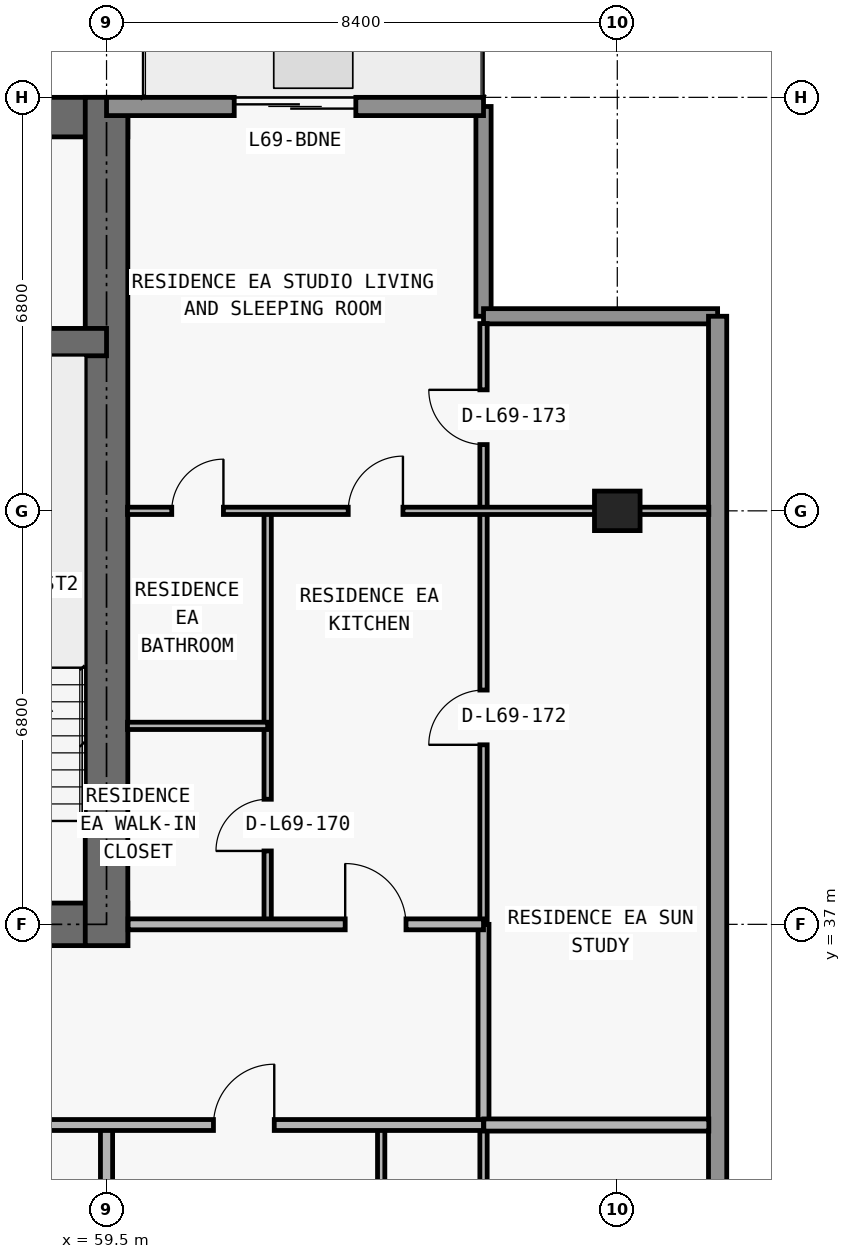
"""IFC4 building model, lengths in metres.
Left out: names, types, materials, properties, quantities, classifications, styles, units other than length and angle.
Written with IfcOpenShell. Run it as: python <this file> out.ifc"""

import sys

from ifc_helpers import new_model, si_unit, direction, frame, frame_2d, origin, origin_2d, place, context, subcontext, project, spatial, rectangle, extrude, element, fill, save


model = new_model("IFC4")
c1 = context("Model", 3, precision=1e-05, world=origin(), true_north=direction((0.0, 1.0)))
c2 = subcontext(c1, "Body", "Model", "MODEL_VIEW")
j1 = project(units=[si_unit("LENGTHUNIT", "METRE"), si_unit("PLANEANGLEUNIT", "RADIAN")], contexts=[c1])
p1 = place(None, origin())
s1 = spatial("IfcSite", under=j1, at=p1, CompositionType="ELEMENT")
p2 = place(p1, origin())
s2 = spatial("IfcBuilding", under=s1, at=p2, CompositionType="ELEMENT")
p3 = place(p2, frame((0.0, 0.0, 246.3)))
s3 = spatial("IfcBuildingStorey", under=s2, at=p3, CompositionType="ELEMENT", Elevation=246.3)
p4 = place(p3, frame((67.9, 43.8, 0.0), z_axis=(0.0, 0.0, 1.0), x_axis=(1.0, 0.0, 0.0)))
e1 = element("IfcColumn", 1, at=p4, inside=s3, PredefinedType="COLUMN", context=c2, shape_type="SweptSolid", body=[
    extrude(rectangle(XDim=0.75, YDim=0.65, at=origin_2d()), origin(), (0.0, 0.0, 1.0), 3.05),
])
p5 = place(p3, frame((17.95, 37.0, 0.0), z_axis=(0.0, 0.0, 1.0), x_axis=(1.0, 0.0, 0.0)))
e2 = element("IfcWall", 2, at=p5, inside=s3, PredefinedType="SHEAR", context=c2, shape_type="SweptSolid", body=[
    extrude(rectangle(XDim=41.9, YDim=0.7, at=frame_2d((20.95, 0.0))), origin(), (0.0, 0.0, 1.0), 3.05),
])
p6 = place(p5, frame((14.35, 0.0, 0.0)))
e3 = element("IfcOpeningElement", 3, at=p6, cuts=e2, PredefinedType="OPENING", context=c2, shape_type="SweptSolid", body=[
    extrude(rectangle(XDim=1.1, YDim=2.15, at=frame_2d((0.55, 1.075))), frame((0.0, 0.36, 0.0), z_axis=(0.0, -1.0, 0.0), x_axis=(1.0, 0.0, 0.0)), (0.0, 0.0, 1.0), 0.72),
])
p7 = place(p5, frame((6.2, 0.0, 0.0)))
e4 = element("IfcOpeningElement", 4, at=p7, cuts=e2, PredefinedType="OPENING", context=c2, shape_type="SweptSolid", body=[
    extrude(rectangle(XDim=1.05, YDim=2.15, at=frame_2d((0.525, 1.075))), frame((0.0, 0.36, 0.0), z_axis=(0.0, -1.0, 0.0), x_axis=(1.0, 0.0, 0.0)), (0.0, 0.0, 1.0), 0.72),
])
p8 = place(p5, frame((34.7, 0.0, 0.0)))
e5 = element("IfcOpeningElement", 5, at=p8, cuts=e2, PredefinedType="OPENING", context=c2, shape_type="SweptSolid", body=[
    extrude(rectangle(XDim=1.05, YDim=2.15, at=frame_2d((0.525, 1.075))), frame((0.0, 0.36, 0.0), z_axis=(0.0, -1.0, 0.0), x_axis=(1.0, 0.0, 0.0)), (0.0, 0.0, 1.0), 0.72),
])
p9 = place(p5, frame((10.812, 0.0, 0.0)))
e6 = element("IfcOpeningElement", 6, at=p9, cuts=e2, PredefinedType="OPENING", context=c2, shape_type="SweptSolid", body=[
    extrude(rectangle(XDim=1.05, YDim=2.15, at=frame_2d((0.525, 1.075))), frame((0.0, 0.36, 0.0), z_axis=(0.0, -1.0, 0.0), x_axis=(1.0, 0.0, 0.0)), (0.0, 0.0, 1.0), 0.72),
])
p10 = place(p5, frame((24.05, 0.0, 0.0)))
e7 = element("IfcOpeningElement", 7, at=p10, cuts=e2, PredefinedType="OPENING", context=c2, shape_type="SweptSolid", body=[
    extrude(rectangle(XDim=1.05, YDim=2.15, at=frame_2d((0.525, 1.075))), frame((0.0, 0.36, 0.0), z_axis=(0.0, -1.0, 0.0), x_axis=(1.0, 0.0, 0.0)), (0.0, 0.0, 1.0), 0.72),
])
p11 = place(p3, frame((17.95, 50.275, 0.0), z_axis=(0.0, 0.0, 1.0), x_axis=(1.0, 0.0, 0.0)))
e8 = element("IfcWall", 8, at=p11, inside=s3, PredefinedType="SHEAR", context=c2, shape_type="SweptSolid", body=[
    extrude(rectangle(XDim=41.9, YDim=0.65, at=frame_2d((20.95, 0.0))), origin(), (0.0, 0.0, 1.0), 3.05),
])
p12 = place(p3, frame((59.5, 36.65, 0.0), z_axis=(0.0, 0.0, 1.0), x_axis=(0.0, 1.0, 0.0)))
e9 = element("IfcWall", 9, at=p12, inside=s3, PredefinedType="SHEAR", context=c2, shape_type="SweptSolid", body=[
    extrude(rectangle(XDim=13.95, YDim=0.7, at=frame_2d((6.975, 0.0))), origin(), (0.0, 0.0, 1.0), 3.05),
])
p13 = place(p3, frame((18.3, 46.575, 0.0), z_axis=(0.0, 0.0, 1.0), x_axis=(1.0, 0.0, 0.0)))
e10 = element("IfcWall", 10, at=p13, inside=s3, PredefinedType="SHEAR", context=c2, shape_type="SweptSolid", body=[
    extrude(rectangle(XDim=41.2, YDim=0.45, at=frame_2d((20.6, 0.0))), origin(), (0.0, 0.0, 1.0), 3.05),
])
p14 = place(p13, frame((7.6, 0.0, 0.0)))
e11 = element("IfcOpeningElement", 11, at=p14, cuts=e10, PredefinedType="OPENING", context=c2, shape_type="SweptSolid", body=[
    extrude(rectangle(XDim=1.0, YDim=2.2, at=frame_2d((0.5, 1.1))), frame((0.0, 0.235, 0.0), z_axis=(0.0, -1.0, 0.0), x_axis=(1.0, 0.0, 0.0)), (0.0, 0.0, 1.0), 0.47),
])
p15 = place(p13, frame((32.625, 0.0, 0.0)))
e12 = element("IfcOpeningElement", 12, at=p15, cuts=e10, PredefinedType="OPENING", context=c2, shape_type="SweptSolid", body=[
    extrude(rectangle(XDim=1.05, YDim=2.15, at=frame_2d((0.525, 1.075))), frame((0.0, 0.235, 0.0), z_axis=(0.0, -1.0, 0.0), x_axis=(1.0, 0.0, 0.0)), (0.0, 0.0, 1.0), 0.47),
])
p16 = place(p3, frame((65.7, 50.45, 0.0), z_axis=(0.0, 0.0, 1.0), x_axis=(0.0, -1.0, 0.0)))
e13 = element("IfcWall", 13, at=p16, inside=s3, PredefinedType="ELEMENTEDWALL", context=c2, shape_type="SweptSolid", body=[
    extrude(rectangle(XDim=3.45, YDim=0.25, at=frame_2d((1.725, 0.0))), origin(), (0.0, 0.0, 1.0), 3.05),
])
p17 = place(p3, frame((65.7, 47.0, 0.0), z_axis=(0.0, 0.0, 1.0), x_axis=(1.0, 0.0, 0.0)))
e14 = element("IfcWall", 14, at=p17, inside=s3, PredefinedType="ELEMENTEDWALL", context=c2, shape_type="SweptSolid", body=[
    extrude(rectangle(XDim=3.85, YDim=0.25, at=frame_2d((1.925, 0.0))), origin(), (0.0, 0.0, 1.0), 3.05),
])
p18 = place(p3, frame((69.55, 47.0, 0.0), z_axis=(0.0, 0.0, 1.0), x_axis=(0.0, -1.0, 0.0)))
e15 = element("IfcWall", 15, at=p18, inside=s3, PredefinedType="STANDARD", context=c2, shape_type="SweptSolid", body=[
    extrude(rectangle(XDim=16.85, YDim=0.3, at=frame_2d((8.425, 0.0))), origin(), (0.0, 0.0, 1.0), 3.05),
])
p19 = place(p3, frame((59.5, 50.45, 0.0), z_axis=(0.0, 0.0, 1.0), x_axis=(1.0, 0.0, 0.0)))
e16 = element("IfcWall", 16, at=p19, inside=s3, PredefinedType="STANDARD", context=c2, shape_type="SweptSolid", body=[
    extrude(rectangle(XDim=6.2, YDim=0.3, at=frame_2d((3.1, 0.0))), origin(), (0.0, 0.0, 1.0), 3.05),
])
p20 = place(p19, frame((2.1, 0.0, 0.0)))
e17 = element("IfcOpeningElement", 17, at=p20, cuts=e16, PredefinedType="OPENING", context=c2, shape_type="SweptSolid", body=[
    extrude(rectangle(XDim=2.0, YDim=2.3, at=frame_2d((1.0, 1.15))), frame((0.0, 0.16, 0.0), z_axis=(0.0, -1.0, 0.0), x_axis=(1.0, 0.0, 0.0)), (0.0, 0.0, 1.0), 0.32),
])
p21 = place(p3, frame((59.5, 27.64, 0.0), z_axis=(0.0, 0.0, 1.0), x_axis=(0.0, 1.0, 0.0)))
e18 = element("IfcWall", 18, at=p21, inside=s3, PredefinedType="PARTITIONING", context=c2, shape_type="SweptSolid", body=[
    extrude(rectangle(XDim=6.06, YDim=0.2, at=frame_2d((3.03, 0.0))), origin(), (0.0, 0.0, 1.0), 2.263),
])
p22 = place(p3, frame((62.15, 37.0, 0.0), z_axis=(0.0, 0.0, 1.0), x_axis=(0.0, 1.0, 0.0)))
e19 = element("IfcWall", 19, at=p22, inside=s3, PredefinedType="PARTITIONING", context=c2, shape_type="SweptSolid", body=[
    extrude(rectangle(XDim=6.8, YDim=0.12, at=frame_2d((3.4, 0.0))), origin(), (0.0, 0.0, 1.0), 3.05),
])
p23 = place(p22, frame((1.207, 0.0, 0.0)))
e20 = element("IfcOpeningElement", 20, at=p23, cuts=e19, PredefinedType="OPENING", context=c2, shape_type="SweptSolid", body=[
    extrude(rectangle(XDim=0.85, YDim=2.1, at=frame_2d((0.425, 1.05))), frame((0.0, 0.07, 0.0), z_axis=(0.0, -1.0, 0.0), x_axis=(1.0, 0.0, 0.0)), (0.0, 0.0, 1.0), 0.14),
])
p24 = place(p3, frame((64.017, 27.64, 0.0), z_axis=(0.0, 0.0, 1.0), x_axis=(0.0, 1.0, 0.0)))
e21 = element("IfcWall", 21, at=p24, inside=s3, PredefinedType="PARTITIONING", context=c2, shape_type="SweptSolid", body=[
    extrude(rectangle(XDim=6.06, YDim=0.12, at=frame_2d((3.03, 0.0))), origin(), (0.0, 0.0, 1.0), 3.05),
])
p25 = place(p24, frame((2.605, 0.0, 0.0)))
e22 = element("IfcOpeningElement", 22, at=p25, cuts=e21, PredefinedType="OPENING", context=c2, shape_type="SweptSolid", body=[
    extrude(rectangle(XDim=0.85, YDim=2.1, at=frame_2d((0.425, 1.05))), frame((0.0, 0.07, 0.0), z_axis=(0.0, -1.0, 0.0), x_axis=(1.0, 0.0, 0.0)), (0.0, 0.0, 1.0), 0.14),
])
p26 = place(p3, frame((65.7, 27.64, 0.0), z_axis=(0.0, 0.0, 1.0), x_axis=(0.0, 1.0, 0.0)))
e23 = element("IfcWall", 23, at=p26, inside=s3, PredefinedType="PARTITIONING", context=c2, shape_type="SweptSolid", body=[
    extrude(rectangle(XDim=6.06, YDim=0.12, at=frame_2d((3.03, 0.0))), origin(), (0.0, 0.0, 1.0), 2.629),
])
p27 = place(p3, frame((65.7, 33.705, 0.0), z_axis=(0.0, 0.0, 1.0), x_axis=(0.0, 1.0, 0.0)))
e24 = element("IfcWall", 24, at=p27, inside=s3, PredefinedType="PARTITIONING", context=c2, shape_type="SweptSolid", body=[
    extrude(rectangle(XDim=3.295, YDim=0.18, at=frame_2d((1.647, 0.0))), origin(), (0.0, 0.0, 1.0), 2.629),
])
p28 = place(p3, frame((65.7, 37.005, 0.0), z_axis=(0.0, 0.0, 1.0), x_axis=(0.0, 1.0, 0.0)))
e25 = element("IfcWall", 25, at=p28, inside=s3, PredefinedType="PARTITIONING", context=c2, shape_type="SweptSolid", body=[
    extrude(rectangle(XDim=9.875, YDim=0.12, at=frame_2d((4.938, 0.0))), origin(), (0.0, 0.0, 1.0), 2.629),
])
p29 = place(p28, frame((2.948, 0.0, 0.0)))
e26 = element("IfcOpeningElement", 26, at=p29, cuts=e25, PredefinedType="OPENING", context=c2, shape_type="SweptSolid", body=[
    extrude(rectangle(XDim=0.9, YDim=2.15, at=frame_2d((0.45, 1.075))), frame((0.0, 0.07, 0.0), z_axis=(0.0, -1.0, 0.0), x_axis=(1.0, 0.0, 0.0)), (0.0, 0.0, 1.0), 0.14),
])
p30 = place(p28, frame((7.885, 0.0, 0.0)))
e27 = element("IfcOpeningElement", 27, at=p30, cuts=e25, PredefinedType="OPENING", context=c2, shape_type="SweptSolid", body=[
    extrude(rectangle(XDim=0.9, YDim=2.15, at=frame_2d((0.45, 1.075))), frame((0.0, 0.07, 0.0), z_axis=(0.0, -1.0, 0.0), x_axis=(1.0, 0.0, 0.0)), (0.0, 0.0, 1.0), 0.14),
])
p31 = place(p3, frame((41.2, 33.7, 0.0), z_axis=(0.0, 0.0, 1.0), x_axis=(1.0, 0.0, 0.0)))
e28 = element("IfcWall", 28, at=p31, inside=s3, PredefinedType="PARTITIONING", context=c2, shape_type="SweptSolid", body=[
    extrude(rectangle(XDim=24.5, YDim=0.18, at=frame_2d((12.25, 0.0))), origin(), (0.0, 0.0, 1.0), 3.05),
])
p32 = place(p31, frame((12.775, 0.0, 0.0)))
e29 = element("IfcOpeningElement", 29, at=p32, cuts=e28, PredefinedType="OPENING", context=c2, shape_type="SweptSolid", body=[
    extrude(rectangle(XDim=1.0, YDim=2.2, at=frame_2d((0.5, 1.1))), frame((0.0, 0.1, 0.0), z_axis=(0.0, -1.0, 0.0), x_axis=(1.0, 0.0, 0.0)), (0.0, 0.0, 1.0), 0.2),
])
p33 = place(p31, frame((20.059, 0.0, 0.0)))
e30 = element("IfcOpeningElement", 30, at=p33, cuts=e28, PredefinedType="OPENING", context=c2, shape_type="SweptSolid", body=[
    extrude(rectangle(XDim=1.0, YDim=2.2, at=frame_2d((0.5, 1.1))), frame((0.0, 0.1, 0.0), z_axis=(0.0, -1.0, 0.0), x_axis=(1.0, 0.0, 0.0)), (0.0, 0.0, 1.0), 0.2),
])
p34 = place(p3, frame((65.705, 33.7, 0.0), z_axis=(0.0, 0.0, 1.0), x_axis=(1.0, 0.0, 0.0)))
e31 = element("IfcWall", 31, at=p34, inside=s3, PredefinedType="PARTITIONING", context=c2, shape_type="SweptSolid", body=[
    extrude(rectangle(XDim=3.7, YDim=0.2, at=frame_2d((1.85, 0.0))), origin(), (0.0, 0.0, 1.0), 3.05),
])
p35 = place(p3, frame((59.855, 37.0, 0.0), z_axis=(0.0, 0.0, 1.0), x_axis=(1.0, 0.0, 0.0)))
e32 = element("IfcWall", 32, at=p35, inside=s3, PredefinedType="PARTITIONING", context=c2, shape_type="SweptSolid", body=[
    extrude(rectangle(XDim=5.845, YDim=0.18, at=frame_2d((2.922, 0.0))), origin(), (0.0, 0.0, 1.0), 3.05),
])
p36 = place(p35, frame((3.57, 0.0, 0.0)))
e33 = element("IfcOpeningElement", 33, at=p36, cuts=e32, PredefinedType="OPENING", context=c2, shape_type="SweptSolid", body=[
    extrude(rectangle(XDim=1.0, YDim=2.2, at=frame_2d((0.5, 1.1))), frame((0.0, 0.1, 0.0), z_axis=(0.0, -1.0, 0.0), x_axis=(1.0, 0.0, 0.0)), (0.0, 0.0, 1.0), 0.2),
])
p37 = place(p3, frame((59.845, 40.264, 0.0), z_axis=(0.0, 0.0, 1.0), x_axis=(1.0, 0.0, 0.0)))
e34 = element("IfcWall", 34, at=p37, inside=s3, PredefinedType="PARTITIONING", context=c2, shape_type="SweptSolid", body=[
    extrude(rectangle(XDim=2.305, YDim=0.12, at=frame_2d((1.152, 0.0))), origin(), (0.0, 0.0, 1.0), 3.05),
])
p38 = place(p3, frame((59.845, 43.8, 0.0), z_axis=(0.0, 0.0, 1.0), x_axis=(1.0, 0.0, 0.0)))
e35 = element("IfcWall", 35, at=p38, inside=s3, PredefinedType="PARTITIONING", context=c2, shape_type="SweptSolid", body=[
    extrude(rectangle(XDim=9.56, YDim=0.12, at=frame_2d((4.78, 0.0))), origin(), (0.0, 0.0, 1.0), 2.418),
])
p39 = place(p38, frame((3.63, 0.0, 0.0)))
e36 = element("IfcOpeningElement", 36, at=p39, cuts=e35, PredefinedType="OPENING", context=c2, shape_type="SweptSolid", body=[
    extrude(rectangle(XDim=0.9, YDim=2.15, at=frame_2d((0.45, 1.075))), frame((0.0, 0.07, 0.0), z_axis=(0.0, -1.0, 0.0), x_axis=(1.0, 0.0, 0.0)), (0.0, 0.0, 1.0), 0.14),
])
p40 = place(p38, frame((0.728, 0.0, 0.0)))
e37 = element("IfcOpeningElement", 37, at=p40, cuts=e35, PredefinedType="OPENING", context=c2, shape_type="SweptSolid", body=[
    extrude(rectangle(XDim=0.85, YDim=2.1, at=frame_2d((0.425, 1.05))), frame((0.0, 0.07, 0.0), z_axis=(0.0, -1.0, 0.0), x_axis=(1.0, 0.0, 0.0)), (0.0, 0.0, 1.0), 0.14),
])
p41 = place(p20, origin())
e38 = element("IfcDoor", 38, at=p41, inside=s3, OperationType="DOUBLE_DOOR_SLIDING", PredefinedType="DOOR", context=c2, shape_type="SweptSolid", body=[
    extrude(rectangle(XDim=2.0, YDim=2.3, at=frame_2d((1.0, 1.15))), frame((0.0, 0.025, 0.0), z_axis=(0.0, -1.0, 0.0), x_axis=(1.0, 0.0, 0.0)), (0.0, 0.0, 1.0), 0.05),
])
fill(e17, e38)
p42 = place(p33, origin())
e39 = element("IfcDoor", 39, at=p42, inside=s3, OperationType="SINGLE_SWING_RIGHT", PredefinedType="DOOR", context=c2, shape_type="SweptSolid", body=[
    extrude(rectangle(XDim=1.0, YDim=2.2, at=frame_2d((0.5, 1.1))), frame((0.0, 0.025, 0.0), z_axis=(0.0, -1.0, 0.0), x_axis=(1.0, 0.0, 0.0)), (0.0, 0.0, 1.0), 0.05),
])
fill(e30, e39)
p43 = place(p36, origin())
e40 = element("IfcDoor", 40, at=p43, inside=s3, OperationType="SINGLE_SWING_LEFT", PredefinedType="DOOR", context=c2, shape_type="SweptSolid", body=[
    extrude(rectangle(XDim=1.0, YDim=2.2, at=frame_2d((0.5, 1.1))), frame((0.0, 0.025, 0.0), z_axis=(0.0, -1.0, 0.0), x_axis=(1.0, 0.0, 0.0)), (0.0, 0.0, 1.0), 0.05),
])
fill(e33, e40)
p44 = place(p39, origin())
e41 = element("IfcDoor", 41, at=p44, inside=s3, OperationType="SINGLE_SWING_RIGHT", PredefinedType="DOOR", context=c2, shape_type="SweptSolid", body=[
    extrude(rectangle(XDim=0.9, YDim=2.15, at=frame_2d((0.45, 1.075))), frame((0.0, 0.025, 0.0), z_axis=(0.0, -1.0, 0.0), x_axis=(1.0, 0.0, 0.0)), (0.0, 0.0, 1.0), 0.05),
])
fill(e36, e41)
p45 = place(p23, origin())
e42 = element("IfcDoor", 42, at=p45, inside=s3, OperationType="SINGLE_SWING_LEFT", PredefinedType="DOOR", context=c2, shape_type="SweptSolid", body=[
    extrude(rectangle(XDim=0.85, YDim=2.1, at=frame_2d((0.425, 1.05))), frame((0.0, 0.025, 0.0), z_axis=(0.0, -1.0, 0.0), x_axis=(1.0, 0.0, 0.0)), (0.0, 0.0, 1.0), 0.05),
])
fill(e20, e42)
p46 = place(p40, origin())
e43 = element("IfcDoor", 43, at=p46, inside=s3, OperationType="SINGLE_SWING_RIGHT", PredefinedType="DOOR", context=c2, shape_type="SweptSolid", body=[
    extrude(rectangle(XDim=0.85, YDim=2.1, at=frame_2d((0.425, 1.05))), frame((0.0, 0.025, 0.0), z_axis=(0.0, -1.0, 0.0), x_axis=(1.0, 0.0, 0.0)), (0.0, 0.0, 1.0), 0.05),
])
fill(e37, e43)
p47 = place(p29, origin())
e44 = element("IfcDoor", 44, at=p47, inside=s3, OperationType="SINGLE_SWING_LEFT", PredefinedType="DOOR", context=c2, shape_type="SweptSolid", body=[
    extrude(rectangle(XDim=0.9, YDim=2.15, at=frame_2d((0.45, 1.075))), frame((0.0, 0.025, 0.0), z_axis=(0.0, -1.0, 0.0), x_axis=(1.0, 0.0, 0.0)), (0.0, 0.0, 1.0), 0.05),
])
fill(e26, e44)
p48 = place(p30, origin())
e45 = element("IfcDoor", 45, at=p48, inside=s3, OperationType="SINGLE_SWING_RIGHT", PredefinedType="DOOR", context=c2, shape_type="SweptSolid", body=[
    extrude(rectangle(XDim=0.9, YDim=2.15, at=frame_2d((0.45, 1.075))), frame((0.0, 0.025, 0.0), z_axis=(0.0, -1.0, 0.0), x_axis=(1.0, 0.0, 0.0)), (0.0, 0.0, 1.0), 0.05),
])
fill(e27, e45)
save(model, sys.argv[1])
